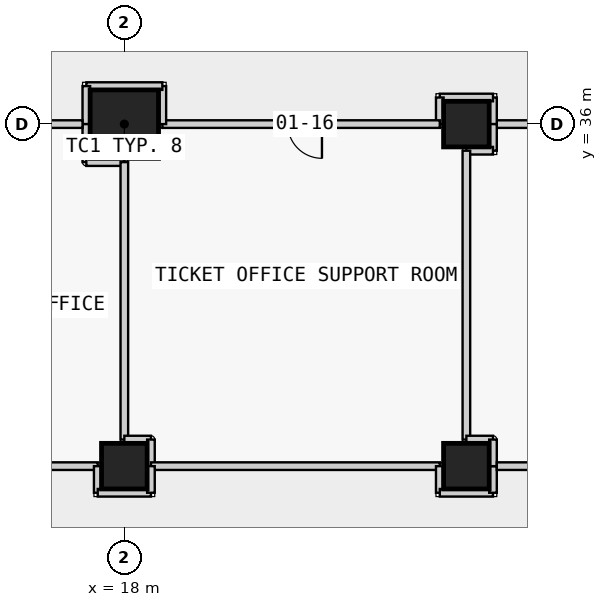
"""IFC4 building model, lengths in metres.
Left out: names, types, materials, properties, quantities, classifications, styles, units other than length and angle.
Written with IfcOpenShell. Run it as: python <this file> out.ifc"""

import sys

from ifc_helpers import new_model, si_unit, direction, frame, frame_2d, origin, origin_2d, place, context, subcontext, project, spatial, rectangle, extrude, element, fill, save


model = new_model("IFC4")
c1 = context("Model", 3, precision=1e-05, world=origin(), true_north=direction((0.0, 1.0)))
c2 = subcontext(c1, "Body", "Model", "MODEL_VIEW")
j1 = project(units=[si_unit("LENGTHUNIT", "METRE"), si_unit("PLANEANGLEUNIT", "RADIAN")], contexts=[c1])
p1 = place(None, origin())
s1 = spatial("IfcSite", under=j1, at=p1, CompositionType="ELEMENT")
p2 = place(p1, origin())
s2 = spatial("IfcBuilding", under=s1, at=p2, CompositionType="ELEMENT")
p3 = place(p2, frame((0.0, 0.0, 8.0)))
s3 = spatial("IfcBuildingStorey", under=s2, at=p3, CompositionType="ELEMENT", Elevation=8.0)
p4 = place(p3, frame((18.0, 27.0, 0.0), z_axis=(0.0, 0.0, 1.0), x_axis=(1.0, 0.0, 0.0)))
e1 = element("IfcColumn", 1, at=p4, inside=s3, PredefinedType="COLUMN", context=c2, shape_type="SweptSolid", body=[
    extrude(rectangle(XDim=1.2, YDim=1.2, at=origin_2d()), origin(), (0.0, 0.0, 1.0), 4.8),
])
p5 = place(p3, frame((18.0, 36.0, 0.0), z_axis=(0.0, 0.0, 1.0), x_axis=(1.0, 0.0, 0.0)))
e2 = element("IfcColumn", 2, at=p5, inside=s3, PredefinedType="COLUMN", context=c2, shape_type="SweptSolid", body=[
    extrude(rectangle(XDim=1.8, YDim=1.8, at=origin_2d()), origin(), (0.0, 0.0, 1.0), 4.8),
])
for number, where, z_axis, x_axis in (
    (3, (27.0, 27.0, 0.0), (0.0, 0.0, 1.0), (1.0, 0.0, 0.0)),
    (4, (27.0, 36.0, 0.0), (0.0, 0.0, 1.0), (1.0, 0.0, 0.0)),
):
    element("IfcColumn", number, at=place(p3, frame(where, z_axis=z_axis, x_axis=x_axis)), inside=s3, PredefinedType="COLUMN", context=c2, shape_type="SweptSolid", body=[
        extrude(rectangle(XDim=1.2, YDim=1.2, at=origin_2d()), origin(), (0.0, 0.0, 1.0), 4.8),
    ])
p6 = place(p3, frame((35.3, 36.0, 0.0), z_axis=(0.0, 0.0, 1.0), x_axis=(-1.0, 0.0, 0.0)))
e5 = element("IfcWall", 5, at=p6, inside=s3, PredefinedType="PARTITIONING", context=c2, shape_type="SweptSolid", body=[
    extrude(rectangle(XDim=7.6, YDim=0.2, at=frame_2d((3.8, 0.0))), origin(), (0.0, 0.0, 1.0), 3.75),
])
p7 = place(p6, frame((3.35, 0.0, 0.0)))
e6 = element("IfcOpeningElement", 6, at=p7, cuts=e5, PredefinedType="OPENING", context=c2, shape_type="SweptSolid", body=[
    extrude(rectangle(XDim=0.9, YDim=2.1, at=frame_2d((0.45, 1.05))), frame((0.0, 0.11, 0.0), z_axis=(0.0, -1.0, 0.0), x_axis=(1.0, 0.0, 0.0)), (0.0, 0.0, 1.0), 0.22),
])
p8 = place(p3, frame((27.7, 36.0, 0.0), z_axis=(0.0, 0.0, 1.0), x_axis=(0.0, 1.0, 0.0)))
e7 = element("IfcWall", 7, at=p8, inside=s3, PredefinedType="PARTITIONING", context=c2, shape_type="SweptSolid", body=[
    extrude(rectangle(XDim=0.7, YDim=0.2, at=frame_2d((0.35, 0.0))), origin(), (0.0, 0.0, 1.0), 3.75),
])
p9 = place(p3, frame((27.7, 36.7, 0.0), z_axis=(0.0, 0.0, 1.0), x_axis=(-1.0, 0.0, 0.0)))
e8 = element("IfcWall", 8, at=p9, inside=s3, PredefinedType="PARTITIONING", context=c2, shape_type="SweptSolid", body=[
    extrude(rectangle(XDim=1.4, YDim=0.2, at=frame_2d((0.7, 0.0))), origin(), (0.0, 0.0, 1.0), 3.75),
])
p10 = place(p3, frame((26.3, 36.7, 0.0), z_axis=(0.0, 0.0, 1.0), x_axis=(0.0, -1.0, 0.0)))
e9 = element("IfcWall", 9, at=p10, inside=s3, PredefinedType="PARTITIONING", context=c2, shape_type="SweptSolid", body=[
    extrude(rectangle(XDim=0.7, YDim=0.2, at=frame_2d((0.35, 0.0))), origin(), (0.0, 0.0, 1.0), 3.75),
])
p11 = place(p3, frame((26.3, 36.0, 0.0), z_axis=(0.0, 0.0, 1.0), x_axis=(-1.0, 0.0, 0.0)))
e10 = element("IfcWall", 10, at=p11, inside=s3, PredefinedType="PARTITIONING", context=c2, shape_type="SweptSolid", body=[
    extrude(rectangle(XDim=7.3, YDim=0.2, at=frame_2d((3.65, 0.0))), origin(), (0.0, 0.0, 1.0), 3.75),
])
p12 = place(p11, frame((3.1, 0.0, 0.0)))
e11 = element("IfcOpeningElement", 11, at=p12, cuts=e10, PredefinedType="OPENING", context=c2, shape_type="SweptSolid", body=[
    extrude(rectangle(XDim=0.9, YDim=2.1, at=frame_2d((0.45, 1.05))), frame((0.0, 0.11, 0.0), z_axis=(0.0, -1.0, 0.0), x_axis=(1.0, 0.0, 0.0)), (0.0, 0.0, 1.0), 0.22),
])
p13 = place(p3, frame((19.0, 36.0, 0.0), z_axis=(0.0, 0.0, 1.0), x_axis=(0.0, 1.0, 0.0)))
e12 = element("IfcWall", 12, at=p13, inside=s3, PredefinedType="PARTITIONING", context=c2, shape_type="SweptSolid", body=[
    extrude(rectangle(XDim=1.0, YDim=0.2, at=frame_2d((0.5, 0.0))), origin(), (0.0, 0.0, 1.0), 3.75),
])
p14 = place(p3, frame((19.0, 37.0, 0.0), z_axis=(0.0, 0.0, 1.0), x_axis=(-1.0, 0.0, 0.0)))
e13 = element("IfcWall", 13, at=p14, inside=s3, PredefinedType="PARTITIONING", context=c2, shape_type="SweptSolid", body=[
    extrude(rectangle(XDim=2.0, YDim=0.2, at=frame_2d((1.0, 0.0))), origin(), (0.0, 0.0, 1.0), 3.75),
])
for number, where, z_axis, x_axis in (
    (14, (17.0, 37.0, 0.0), (0.0, 0.0, 1.0), (0.0, -1.0, 0.0)),
    (15, (17.0, 36.0, 0.0), (0.0, 0.0, 1.0), (0.0, -1.0, 0.0)),
    (16, (17.0, 35.0, 0.0), (0.0, 0.0, 1.0), (1.0, 0.0, 0.0)),
):
    element("IfcWall", number, at=place(p3, frame(where, z_axis=z_axis, x_axis=x_axis)), inside=s3, PredefinedType="PARTITIONING", context=c2, shape_type="SweptSolid", body=[
        extrude(rectangle(XDim=1.0, YDim=0.2, at=frame_2d((0.5, 0.0))), origin(), (0.0, 0.0, 1.0), 3.75),
    ])
p15 = place(p3, frame((18.0, 35.0, 0.0), z_axis=(0.0, 0.0, 1.0), x_axis=(0.0, -1.0, 0.0)))
e17 = element("IfcWall", 17, at=p15, inside=s3, PredefinedType="PARTITIONING", context=c2, shape_type="SweptSolid", body=[
    extrude(rectangle(XDim=7.3, YDim=0.2, at=frame_2d((3.65, 0.0))), origin(), (0.0, 0.0, 1.0), 3.75),
])
for number, where, z_axis, x_axis in (
    (18, (18.0, 27.7, 0.0), (0.0, 0.0, 1.0), (1.0, 0.0, 0.0)),
    (19, (18.7, 27.7, 0.0), (0.0, 0.0, 1.0), (0.0, -1.0, 0.0)),
):
    element("IfcWall", number, at=place(p3, frame(where, z_axis=z_axis, x_axis=x_axis)), inside=s3, PredefinedType="PARTITIONING", context=c2, shape_type="SweptSolid", body=[
        extrude(rectangle(XDim=0.7, YDim=0.2, at=frame_2d((0.35, 0.0))), origin(), (0.0, 0.0, 1.0), 3.75),
    ])
p16 = place(p3, frame((18.7, 27.0, 0.0), z_axis=(0.0, 0.0, 1.0), x_axis=(1.0, 0.0, 0.0)))
e20 = element("IfcWall", 20, at=p16, inside=s3, PredefinedType="PARTITIONING", context=c2, shape_type="SweptSolid", body=[
    extrude(rectangle(XDim=7.6, YDim=0.2, at=frame_2d((3.8, 0.0))), origin(), (0.0, 0.0, 1.0), 3.75),
])
p17 = place(p3, frame((26.3, 27.0, 0.0), z_axis=(0.0, 0.0, 1.0), x_axis=(0.0, -1.0, 0.0)))
e21 = element("IfcWall", 21, at=p17, inside=s3, PredefinedType="PARTITIONING", context=c2, shape_type="SweptSolid", body=[
    extrude(rectangle(XDim=0.7, YDim=0.2, at=frame_2d((0.35, 0.0))), origin(), (0.0, 0.0, 1.0), 3.75),
])
p18 = place(p3, frame((26.3, 26.3, 0.0), z_axis=(0.0, 0.0, 1.0), x_axis=(1.0, 0.0, 0.0)))
e22 = element("IfcWall", 22, at=p18, inside=s3, PredefinedType="PARTITIONING", context=c2, shape_type="SweptSolid", body=[
    extrude(rectangle(XDim=1.4, YDim=0.2, at=frame_2d((0.7, 0.0))), origin(), (0.0, 0.0, 1.0), 3.75),
])
p19 = place(p3, frame((27.7, 26.3, 0.0), z_axis=(0.0, 0.0, 1.0), x_axis=(0.0, 1.0, 0.0)))
e23 = element("IfcWall", 23, at=p19, inside=s3, PredefinedType="PARTITIONING", context=c2, shape_type="SweptSolid", body=[
    extrude(rectangle(XDim=0.7, YDim=0.2, at=frame_2d((0.35, 0.0))), origin(), (0.0, 0.0, 1.0), 3.75),
])
p20 = place(p3, frame((9.7, 27.0, 0.0), z_axis=(0.0, 0.0, 1.0), x_axis=(1.0, 0.0, 0.0)))
e24 = element("IfcWall", 24, at=p20, inside=s3, PredefinedType="PARTITIONING", context=c2, shape_type="SweptSolid", body=[
    extrude(rectangle(XDim=7.6, YDim=0.2, at=frame_2d((3.8, 0.0))), origin(), (0.0, 0.0, 1.0), 3.75),
])
p21 = place(p20, frame((3.35, 0.0, 0.0)))
e25 = element("IfcOpeningElement", 25, at=p21, cuts=e24, PredefinedType="OPENING", context=c2, shape_type="SweptSolid", body=[
    extrude(rectangle(XDim=0.9, YDim=2.1, at=frame_2d((0.45, 1.05))), frame((0.0, 0.11, 0.0), z_axis=(0.0, -1.0, 0.0), x_axis=(1.0, 0.0, 0.0)), (0.0, 0.0, 1.0), 0.22),
])
p22 = place(p3, frame((17.3, 27.0, 0.0), z_axis=(0.0, 0.0, 1.0), x_axis=(0.0, -1.0, 0.0)))
e26 = element("IfcWall", 26, at=p22, inside=s3, PredefinedType="PARTITIONING", context=c2, shape_type="SweptSolid", body=[
    extrude(rectangle(XDim=0.7, YDim=0.2, at=frame_2d((0.35, 0.0))), origin(), (0.0, 0.0, 1.0), 3.75),
])
p23 = place(p3, frame((17.3, 26.3, 0.0), z_axis=(0.0, 0.0, 1.0), x_axis=(1.0, 0.0, 0.0)))
e27 = element("IfcWall", 27, at=p23, inside=s3, PredefinedType="PARTITIONING", context=c2, shape_type="SweptSolid", body=[
    extrude(rectangle(XDim=1.4, YDim=0.2, at=frame_2d((0.7, 0.0))), origin(), (0.0, 0.0, 1.0), 4.45),
])
for number, where, z_axis, x_axis in (
    (28, (18.7, 26.3, 0.0), (0.0, 0.0, 1.0), (0.0, 1.0, 0.0)),
    (29, (27.7, 36.0, 0.0), (0.0, 0.0, 1.0), (0.0, -1.0, 0.0)),
    (30, (27.7, 35.3, 0.0), (0.0, 0.0, 1.0), (-1.0, 0.0, 0.0)),
):
    element("IfcWall", number, at=place(p3, frame(where, z_axis=z_axis, x_axis=x_axis)), inside=s3, PredefinedType="PARTITIONING", context=c2, shape_type="SweptSolid", body=[
        extrude(rectangle(XDim=0.7, YDim=0.2, at=frame_2d((0.35, 0.0))), origin(), (0.0, 0.0, 1.0), 3.75),
    ])
p24 = place(p3, frame((27.0, 35.3, 0.0), z_axis=(0.0, 0.0, 1.0), x_axis=(0.0, -1.0, 0.0)))
e31 = element("IfcWall", 31, at=p24, inside=s3, PredefinedType="PARTITIONING", context=c2, shape_type="SweptSolid", body=[
    extrude(rectangle(XDim=7.6, YDim=0.2, at=frame_2d((3.8, 0.0))), origin(), (0.0, 0.0, 1.0), 3.75),
])
for number, where, z_axis, x_axis in (
    (32, (27.0, 27.7, 0.0), (0.0, 0.0, 1.0), (1.0, 0.0, 0.0)),
    (33, (27.7, 27.7, 0.0), (0.0, 0.0, 1.0), (0.0, -1.0, 0.0)),
):
    element("IfcWall", number, at=place(p3, frame(where, z_axis=z_axis, x_axis=x_axis)), inside=s3, PredefinedType="PARTITIONING", context=c2, shape_type="SweptSolid", body=[
        extrude(rectangle(XDim=0.7, YDim=0.2, at=frame_2d((0.35, 0.0))), origin(), (0.0, 0.0, 1.0), 3.75),
    ])
p25 = place(p3, frame((16.9, 36.0, 0.0), z_axis=(0.0, 0.0, 1.0), x_axis=(-1.0, 0.0, 0.0)))
e34 = element("IfcWall", 34, at=p25, inside=s3, PredefinedType="PARTITIONING", context=c2, shape_type="SweptSolid", body=[
    extrude(rectangle(XDim=7.2, YDim=0.2, at=frame_2d((3.6, 0.0))), origin(), (0.0, 0.0, 1.0), 3.75),
])
p26 = place(p3, frame((27.8, 27.0, 0.0), z_axis=(0.0, 0.0, 1.0), x_axis=(1.0, 0.0, 0.0)))
e35 = element("IfcWall", 35, at=p26, inside=s3, PredefinedType="PARTITIONING", context=c2, shape_type="SweptSolid", body=[
    extrude(rectangle(XDim=2.8, YDim=0.2, at=frame_2d((1.4, 0.0))), origin(), (0.0, 0.0, 1.0), 3.75),
])
p27 = place(p12, origin())
e36 = element("IfcDoor", 36, at=p27, inside=s3, OperationType="SINGLE_SWING_LEFT", PredefinedType="DOOR", context=c2, shape_type="SweptSolid", body=[
    extrude(rectangle(XDim=0.9, YDim=2.1, at=frame_2d((0.45, 1.05))), frame((0.0, 0.025, 0.0), z_axis=(0.0, -1.0, 0.0), x_axis=(1.0, 0.0, 0.0)), (0.0, 0.0, 1.0), 0.05),
])
fill(e11, e36)
save(model, sys.argv[1])
